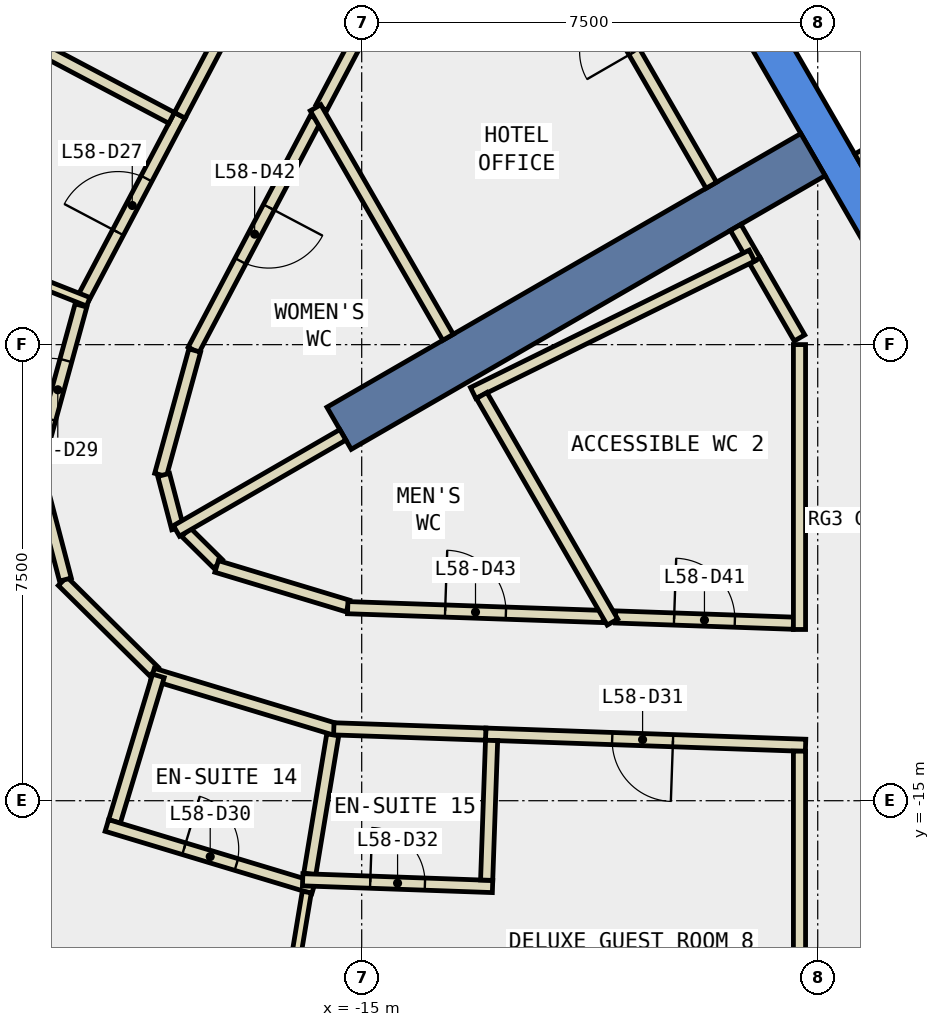
"""IFC4 building model, lengths in metres.
Left out: names, types, materials, properties, quantities, classifications, styles, units other than length and angle.
Written with IfcOpenShell. Run it as: python <this file> out.ifc"""

import sys

from ifc_helpers import new_model, si_unit, direction, frame, frame_2d, origin, place, context, subcontext, project, spatial, polyline, rectangle, outline, extrude, element, fill, save


model = new_model("IFC4")
c1 = context("Model", 3, precision=1e-05, world=origin(), true_north=direction((0.0, 1.0)))
c2 = subcontext(c1, "Body", "Model", "MODEL_VIEW")
j1 = project(units=[si_unit("LENGTHUNIT", "METRE"), si_unit("PLANEANGLEUNIT", "RADIAN")], contexts=[c1])
p1 = place(None, origin())
s1 = spatial("IfcSite", under=j1, at=p1, CompositionType="ELEMENT")
p2 = place(p1, origin())
s2 = spatial("IfcBuilding", under=s1, at=p2, CompositionType="ELEMENT")
p3 = place(p2, frame((0.0, 0.0, 255.8)))
s3 = spatial("IfcBuildingStorey", under=s2, at=p3, CompositionType="ELEMENT", Elevation=255.8)
p4 = place(p3, frame((0.0, 0.0, -0.34)))
e1 = element("IfcWall", 1, at=p4, inside=s3, PredefinedType="SHEAR", context=c2, shape_type="SweptSolid", body=[
    extrude(outline(polyline([(-11.547, 2.5), (-5.774, -7.5), (-5.427, -6.9), (-10.854, 2.5), (-11.547, 2.5)])), origin(), (0.0, 0.0, 1.0), 3.6),
])
p5 = place(p3, frame((-7.578, -4.375, -0.34), z_axis=(0.0, 0.0, 1.0), x_axis=(-0.866024315419, -0.5000018851, 0.0)))
e2 = element("IfcWall", 2, at=p5, inside=s3, PredefinedType="SHEAR", context=c2, shape_type="SweptSolid", body=[
    extrude(rectangle(XDim=9.0, YDim=0.8, at=frame_2d((4.5, 0.0))), origin(), (0.0, 0.0, 1.0), 3.6),
])
p6 = place(p3, frame((-8.532, -6.123, 0.0), z_axis=(0.0, 0.0, 1.0), x_axis=(-0.499977104415, 0.866038622153, 0.0)))
e3 = element("IfcWall", 3, at=p6, inside=s3, PredefinedType="PARTITIONING", context=c2, shape_type="SweptSolid", body=[
    extrude(rectangle(XDim=0.636, YDim=0.2, at=frame_2d((0.318, 0.0))), origin(), (0.0, 0.0, 1.0), 3.26),
])
p7 = place(p3, frame((-15.064, -2.468, 0.0), z_axis=(0.0, 0.0, 1.0), x_axis=(-0.467126648849, -0.884190417238, 0.0)))
e4 = element("IfcWall", 4, at=p7, inside=s3, PredefinedType="PARTITIONING", context=c2, shape_type="SweptSolid", body=[
    extrude(rectangle(XDim=1.282, YDim=0.2, at=frame_2d((0.641, 0.0))), origin(), (0.0, 0.0, 1.0), 3.26),
])
p8 = place(p3, frame((-7.8, -7.39, 0.0), z_axis=(0.0, 0.0, 1.0), x_axis=(-0.500266477503, 0.865871498253, 0.0)))
e5 = element("IfcWall", 5, at=p8, inside=s3, PredefinedType="PARTITIONING", context=c2, shape_type="SweptSolid", body=[
    extrude(rectangle(XDim=1.463, YDim=0.2, at=frame_2d((0.731, 0.0))), origin(), (0.0, 0.0, 1.0), 3.26),
])
p9 = place(p3, frame((-10.826, -11.978, 0.0), z_axis=(0.0, 0.0, 1.0), x_axis=(0.999380679818, -0.035188873332, 0.0)))
e6 = element("IfcWall", 6, at=p9, inside=s3, PredefinedType="PARTITIONING", context=c2, shape_type="SweptSolid", body=[
    extrude(rectangle(XDim=2.928, YDim=0.2, at=frame_2d((1.464, 0.0))), origin(), (0.0, 0.0, 1.0), 3.26),
])
p10 = place(p9, frame((0.964, 0.0, 0.0)))
e7 = element("IfcOpeningElement", 7, at=p10, cuts=e6, PredefinedType="OPENING", context=c2, shape_type="SweptSolid", body=[
    extrude(rectangle(XDim=1.0, YDim=2.1, at=frame_2d((0.5, 1.05))), frame((0.0, 0.11, 0.0), z_axis=(0.0, -1.0, 0.0), x_axis=(1.0, 0.0, 0.0)), (0.0, 0.0, 1.0), 0.22),
])
p11 = place(p3, frame((-15.756, -3.779, 0.0), z_axis=(0.0, 0.0, 1.0), x_axis=(-0.46672043873, -0.884404902786, 0.0)))
e8 = element("IfcWall", 8, at=p11, inside=s3, PredefinedType="PARTITIONING", context=c2, shape_type="SweptSolid", body=[
    extrude(rectangle(XDim=4.307, YDim=0.2, at=frame_2d((2.153, 0.0))), origin(), (0.0, 0.0, 1.0), 3.26),
])
p12 = place(p11, frame((1.653, 0.0, 0.0)))
e9 = element("IfcOpeningElement", 9, at=p12, cuts=e8, PredefinedType="OPENING", context=c2, shape_type="SweptSolid", body=[
    extrude(rectangle(XDim=1.0, YDim=2.1, at=frame_2d((0.5, 1.05))), frame((0.0, 0.11, 0.0), z_axis=(0.0, -1.0, 0.0), x_axis=(1.0, 0.0, 0.0)), (0.0, 0.0, 1.0), 0.22),
])
p13 = place(p3, frame((-17.746, -7.596, 0.0), z_axis=(0.0, 0.0, 1.0), x_axis=(-0.264859637197, -0.96428697626, 0.0)))
e10 = element("IfcWall", 10, at=p13, inside=s3, PredefinedType="PARTITIONING", context=c2, shape_type="SweptSolid", body=[
    extrude(rectangle(XDim=2.122, YDim=0.2, at=frame_2d((1.061, 0.0))), origin(), (0.0, 0.0, 1.0), 3.26),
])
p14 = place(p3, frame((-18.257, -9.642, 0.0), z_axis=(0.0, 0.0, 1.0), x_axis=(0.253407342366, -0.967359663639, 0.0)))
e11 = element("IfcWall", 11, at=p14, inside=s3, PredefinedType="PARTITIONING", context=c2, shape_type="SweptSolid", body=[
    extrude(rectangle(XDim=0.907, YDim=0.2, at=frame_2d((0.454, 0.0))), origin(), (0.0, 0.0, 1.0), 3.26),
])
p15 = place(p3, frame((-17.89, -10.584, 0.0), z_axis=(0.0, 0.0, 1.0), x_axis=(0.711042348586, -0.70314918653, 0.0)))
e12 = element("IfcWall", 12, at=p15, inside=s3, PredefinedType="PARTITIONING", context=c2, shape_type="SweptSolid", body=[
    extrude(rectangle(XDim=0.742, YDim=0.2, at=frame_2d((0.371, 0.0))), origin(), (0.0, 0.0, 1.0), 3.26),
])
p16 = place(p3, frame((-17.386, -11.147, 0.0), z_axis=(0.0, 0.0, 1.0), x_axis=(0.957321496956, -0.289025174451, 0.0)))
e13 = element("IfcWall", 13, at=p16, inside=s3, PredefinedType="PARTITIONING", context=c2, shape_type="SweptSolid", body=[
    extrude(rectangle(XDim=2.256, YDim=0.2, at=frame_2d((1.128, 0.0))), origin(), (0.0, 0.0, 1.0), 3.26),
])
p17 = place(p3, frame((-15.23, -11.825, 0.0), z_axis=(0.0, 0.0, 1.0), x_axis=(0.999397560436, -0.0347061406, 0.0)))
e14 = element("IfcWall", 14, at=p17, inside=s3, PredefinedType="PARTITIONING", context=c2, shape_type="SweptSolid", body=[
    extrude(rectangle(XDim=4.207, YDim=0.2, at=frame_2d((2.103, 0.0))), origin(), (0.0, 0.0, 1.0), 3.26),
])
p18 = place(p17, frame((1.603, 0.0, 0.0)))
e15 = element("IfcOpeningElement", 15, at=p18, cuts=e14, PredefinedType="OPENING", context=c2, shape_type="SweptSolid", body=[
    extrude(rectangle(XDim=1.0, YDim=2.1, at=frame_2d((0.5, 1.05))), frame((0.0, 0.11, 0.0), z_axis=(0.0, -1.0, 0.0), x_axis=(1.0, 0.0, 0.0)), (0.0, 0.0, 1.0), 0.22),
])
p19 = place(p3, frame((-19.602, -6.781, 0.0), z_axis=(0.0, 0.0, 1.0), x_axis=(0.466827780692, 0.884348247679, 0.0)))
e16 = element("IfcWall", 16, at=p19, inside=s3, PredefinedType="PARTITIONING", context=c2, shape_type="SweptSolid", body=[
    extrude(rectangle(XDim=3.451, YDim=0.2, at=frame_2d((1.726, 0.0))), origin(), (0.0, 0.0, 1.0), 3.26),
])
p20 = place(p19, frame((1.275, 0.0, 0.0)))
e17 = element("IfcOpeningElement", 17, at=p20, cuts=e16, PredefinedType="OPENING", context=c2, shape_type="SweptSolid", body=[
    extrude(rectangle(XDim=1.0, YDim=2.1, at=frame_2d((0.5, 1.05))), frame((0.0, 0.11, 0.0), z_axis=(0.0, -1.0, 0.0), x_axis=(1.0, 0.0, 0.0)), (0.0, 0.0, 1.0), 0.22),
])
p21 = place(p3, frame((-17.991, -3.729, 0.0), z_axis=(0.0, 0.0, 1.0), x_axis=(0.466450569784, 0.88454726609, 0.0)))
e18 = element("IfcWall", 18, at=p21, inside=s3, PredefinedType="PARTITIONING", context=c2, shape_type="SweptSolid", body=[
    extrude(rectangle(XDim=2.6, YDim=0.2, at=frame_2d((1.3, 0.0))), origin(), (0.0, 0.0, 1.0), 3.26),
])
p22 = place(p3, frame((-18.415, -12.877, 0.0), z_axis=(0.0, 0.0, 1.0), x_axis=(-0.711078065077, 0.70311306727, 0.0)))
e19 = element("IfcWall", 19, at=p22, inside=s3, PredefinedType="PARTITIONING", context=c2, shape_type="SweptSolid", body=[
    extrude(rectangle(XDim=2.115, YDim=0.2, at=frame_2d((1.058, 0.0))), origin(), (0.0, 0.0, 1.0), 3.26),
])
p23 = place(p3, frame((-19.873, -11.363, 0.0), z_axis=(0.0, 0.0, 1.0), x_axis=(-0.253192482031, 0.967415922467, 0.0)))
e20 = element("IfcWall", 20, at=p23, inside=s3, PredefinedType="PARTITIONING", context=c2, shape_type="SweptSolid", body=[
    extrude(rectangle(XDim=1.792, YDim=0.2, at=frame_2d((0.896, 0.0))), origin(), (0.0, 0.0, 1.0), 3.26),
])
p24 = place(p3, frame((-20.379, -9.629, 0.0), z_axis=(0.0, 0.0, 1.0), x_axis=(0.26487636938, 0.964282380293, 0.0)))
e21 = element("IfcWall", 21, at=p24, inside=s3, PredefinedType="PARTITIONING", context=c2, shape_type="SweptSolid", body=[
    extrude(rectangle(XDim=2.877, YDim=0.2, at=frame_2d((1.438, 0.0))), origin(), (0.0, 0.0, 1.0), 3.26),
])
p25 = place(p24, frame((0.938, 0.0, 0.0)))
e22 = element("IfcOpeningElement", 22, at=p25, cuts=e21, PredefinedType="OPENING", context=c2, shape_type="SweptSolid", body=[
    extrude(rectangle(XDim=1.0, YDim=2.1, at=frame_2d((0.5, 1.05))), frame((0.0, 0.11, 0.0), z_axis=(0.0, -1.0, 0.0), x_axis=(1.0, 0.0, 0.0)), (0.0, 0.0, 1.0), 0.22),
])
p26 = place(p3, frame((-15.363, -13.847, 0.0), z_axis=(0.0, 0.0, 1.0), x_axis=(-0.957320969561, 0.289026921303, 0.0)))
e23 = element("IfcWall", 23, at=p26, inside=s3, PredefinedType="PARTITIONING", context=c2, shape_type="SweptSolid", body=[
    extrude(rectangle(XDim=3.214, YDim=0.2, at=frame_2d((1.607, 0.0))), origin(), (0.0, 0.0, 1.0), 3.26),
])
p27 = place(p3, frame((-7.7, -14.089, 0.0), z_axis=(0.0, 0.0, 1.0), x_axis=(-0.999388410674, 0.034968623214, 0.0)))
e24 = element("IfcWall", 24, at=p27, inside=s3, PredefinedType="PARTITIONING", context=c2, shape_type="SweptSolid", body=[
    extrude(rectangle(XDim=5.264, YDim=0.2, at=frame_2d((2.632, 0.0))), origin(), (0.0, 0.0, 1.0), 3.26),
])
p28 = place(p27, frame((2.182, 0.0, 0.0)))
e25 = element("IfcOpeningElement", 25, at=p28, cuts=e24, PredefinedType="OPENING", context=c2, shape_type="SweptSolid", body=[
    extrude(rectangle(XDim=1.0, YDim=2.1, at=frame_2d((0.5, 1.05))), frame((0.0, 0.11, 0.0), z_axis=(0.0, -1.0, 0.0), x_axis=(1.0, 0.0, 0.0)), (0.0, 0.0, 1.0), 0.22),
])
p29 = place(p3, frame((-12.961, -13.905, 0.0), z_axis=(0.0, 0.0, 1.0), x_axis=(-0.999395279268, 0.034771766949, 0.0)))
e26 = element("IfcWall", 26, at=p29, inside=s3, PredefinedType="PARTITIONING", context=c2, shape_type="SweptSolid", body=[
    extrude(rectangle(XDim=2.5, YDim=0.2, at=frame_2d((1.25, 0.0))), origin(), (0.0, 0.0, 1.0), 3.26),
])
p30 = place(p3, frame((-6.841, -4.452, 0.0), z_axis=(0.0, 0.0, 1.0), x_axis=(0.86621513555, 0.499671230855, 0.0)))
e27 = element("IfcWall", 27, at=p30, inside=s3, PredefinedType="PARTITIONING", context=c2, shape_type="SweptSolid", body=[
    extrude(rectangle(XDim=1.1, YDim=0.2, at=frame_2d((0.55, 0.0))), origin(), (0.0, 0.0, 1.0), 3.26),
])
p31 = place(p3, frame((-7.8, -12.184, 0.0), z_axis=(0.0, 0.0, 1.0), x_axis=(0.0, 1.0, 0.0)))
e28 = element("IfcWall", 28, at=p31, inside=s3, PredefinedType="PARTITIONING", context=c2, shape_type="SweptSolid", body=[
    extrude(rectangle(XDim=4.685, YDim=0.2, at=frame_2d((2.343, 0.0))), origin(), (0.0, 0.0, 1.0), 3.26),
])
p32 = place(p3, frame((-7.8, -18.669, 0.0), z_axis=(0.0, 0.0, 1.0), x_axis=(0.0, 1.0, 0.0)))
e29 = element("IfcWall", 29, at=p32, inside=s3, PredefinedType="PARTITIONING", context=c2, shape_type="SweptSolid", body=[
    extrude(rectangle(XDim=4.484, YDim=0.2, at=frame_2d((2.242, 0.0))), origin(), (0.0, 0.0, 1.0), 3.26),
])
p33 = place(p3, frame((-8.582, -6.036, 0.0), z_axis=(0.0, 0.0, 1.0), x_axis=(-0.897105141673, -0.441817116897, 0.0)))
e30 = element("IfcWall", 30, at=p33, inside=s3, PredefinedType="PARTITIONING", context=c2, shape_type="SweptSolid", body=[
    extrude(rectangle(XDim=5.111, YDim=0.2, at=frame_2d((2.555, 0.0))), origin(), (0.0, 0.0, 1.0), 3.26),
])
p34 = place(p3, frame((-13.58, -7.379, 0.0), z_axis=(0.0, 0.0, 1.0), x_axis=(-0.499916403993, 0.866073662582, 0.0)))
e31 = element("IfcWall", 31, at=p34, inside=s3, PredefinedType="PARTITIONING", context=c2, shape_type="SweptSolid", body=[
    extrude(rectangle(XDim=4.359, YDim=0.2, at=frame_2d((2.179, 0.0))), origin(), (0.0, 0.0, 1.0), 3.26),
])
p35 = place(p3, frame((-10.876, -12.062, 0.0), z_axis=(0.0, 0.0, 1.0), x_axis=(-0.499977877545, 0.866038175813, 0.0)))
e32 = element("IfcWall", 32, at=p35, inside=s3, PredefinedType="PARTITIONING", context=c2, shape_type="SweptSolid", body=[
    extrude(rectangle(XDim=4.302, YDim=0.2, at=frame_2d((2.151, 0.0))), origin(), (0.0, 0.0, 1.0), 3.26),
])
p36 = place(p3, frame((-15.31, -8.983, 0.0), z_axis=(0.0, 0.0, 1.0), x_axis=(-0.866047943894, -0.499960957353, 0.0)))
e33 = element("IfcWall", 33, at=p36, inside=s3, PredefinedType="PARTITIONING", context=c2, shape_type="SweptSolid", body=[
    extrude(rectangle(XDim=3.16, YDim=0.2, at=frame_2d((1.58, 0.0))), origin(), (0.0, 0.0, 1.0), 3.26),
])
p37 = place(p3, frame((-19.069, -0.418, 0.0), z_axis=(0.0, 0.0, 1.0), x_axis=(-0.467007153784, -0.884253537349, 0.0)))
e34 = element("IfcWall", 34, at=p37, inside=s3, PredefinedType="PARTITIONING", context=c2, shape_type="SweptSolid", body=[
    extrude(rectangle(XDim=2.625, YDim=0.2, at=frame_2d((1.312, 0.0))), origin(), (0.0, 0.0, 1.0), 3.26),
])
p38 = place(p37, frame((0.763, 0.0, 0.0)))
e35 = element("IfcOpeningElement", 35, at=p38, cuts=e34, PredefinedType="OPENING", context=c2, shape_type="SweptSolid", body=[
    extrude(rectangle(XDim=0.9, YDim=2.1, at=frame_2d((0.45, 1.05))), frame((0.0, 0.11, 0.0), z_axis=(0.0, -1.0, 0.0), x_axis=(1.0, 0.0, 0.0)), (0.0, 0.0, 1.0), 0.22),
])
p39 = place(p3, frame((-20.16, -2.697, 0.0), z_axis=(0.0, 0.0, 1.0), x_axis=(0.884293452572, -0.466931568583, 0.0)))
e36 = element("IfcWall", 36, at=p39, inside=s3, PredefinedType="PARTITIONING", context=c2, shape_type="SweptSolid", body=[
    extrude(rectangle(XDim=2.3, YDim=0.2, at=frame_2d((1.15, 0.0))), origin(), (0.0, 0.0, 1.0), 3.26),
])
p40 = place(p3, frame((-19.497, -6.795, 0.0), z_axis=(0.0, 0.0, 1.0), x_axis=(-0.929826906887, 0.367997178289, 0.0)))
e37 = element("IfcWall", 37, at=p40, inside=s3, PredefinedType="PARTITIONING", context=c2, shape_type="SweptSolid", body=[
    extrude(rectangle(XDim=4.717, YDim=0.15, at=frame_2d((2.358, 0.0))), origin(), (0.0, 0.0, 1.0), 3.26),
])
p41 = place(p3, frame((-18.344, -12.947, 0.0), z_axis=(0.0, 0.0, 1.0), x_axis=(-0.288709122303, -0.957416859419, 0.0)))
e38 = element("IfcWall", 38, at=p41, inside=s3, PredefinedType="PARTITIONING", context=c2, shape_type="SweptSolid", body=[
    extrude(rectangle(XDim=2.5, YDim=0.2, at=frame_2d((1.25, 0.0))), origin(), (0.0, 0.0, 1.0), 3.26),
])
p42 = place(p3, frame((-19.191, -15.407, 0.0), z_axis=(0.0, 0.0, 1.0), x_axis=(0.957443200759, -0.28862175476, 0.0)))
e39 = element("IfcWall", 39, at=p42, inside=s3, PredefinedType="PARTITIONING", context=c2, shape_type="SweptSolid", body=[
    extrude(rectangle(XDim=3.551, YDim=0.2, at=frame_2d((1.775, 0.0))), origin(), (0.0, 0.0, 1.0), 3.26),
])
p43 = place(p42, frame((1.325, 0.0, 0.0)))
e40 = element("IfcOpeningElement", 40, at=p43, cuts=e39, PredefinedType="OPENING", context=c2, shape_type="SweptSolid", body=[
    extrude(rectangle(XDim=0.9, YDim=2.1, at=frame_2d((0.45, 1.05))), frame((0.0, 0.11, 0.0), z_axis=(0.0, -1.0, 0.0), x_axis=(1.0, 0.0, 0.0)), (0.0, 0.0, 1.0), 0.22),
])
p44 = place(p3, frame((-15.903, -16.502, 0.0), z_axis=(0.0, 0.0, 1.0), x_axis=(-0.163715562906, -0.986507584594, 0.0)))
e41 = element("IfcWall", 41, at=p44, inside=s3, PredefinedType="PARTITIONING", context=c2, shape_type="SweptSolid", body=[
    extrude(rectangle(XDim=1.912, YDim=0.15, at=frame_2d((0.956, 0.0))), origin(), (0.0, 0.0, 1.0), 3.26),
])
p45 = place(p3, frame((-15.476, -13.917, 0.0), z_axis=(0.0, 0.0, 1.0), x_axis=(-0.162964805234, -0.986631882849, 0.0)))
e42 = element("IfcWall", 42, at=p45, inside=s3, PredefinedType="PARTITIONING", context=c2, shape_type="SweptSolid", body=[
    extrude(rectangle(XDim=2.319, YDim=0.2, at=frame_2d((1.16, 0.0))), origin(), (0.0, 0.0, 1.0), 3.26),
])
p46 = place(p3, frame((-15.971, -16.3, 0.0), z_axis=(0.0, 0.0, 1.0), x_axis=(0.999370791233, -0.035468600627, 0.0)))
e43 = element("IfcWall", 43, at=p46, inside=s3, PredefinedType="PARTITIONING", context=c2, shape_type="SweptSolid", body=[
    extrude(rectangle(XDim=3.125, YDim=0.2, at=frame_2d((1.562, 0.0))), origin(), (0.0, 0.0, 1.0), 3.26),
])
p47 = place(p46, frame((1.112, 0.0, 0.0)))
e44 = element("IfcOpeningElement", 44, at=p47, cuts=e43, PredefinedType="OPENING", context=c2, shape_type="SweptSolid", body=[
    extrude(rectangle(XDim=0.9, YDim=2.1, at=frame_2d((0.45, 1.05))), frame((0.0, 0.11, 0.0), z_axis=(0.0, -1.0, 0.0), x_axis=(1.0, 0.0, 0.0)), (0.0, 0.0, 1.0), 0.22),
])
p48 = place(p3, frame((-12.945, -16.307, 0.0), z_axis=(0.0, 0.0, 1.0), x_axis=(0.035252193458, 0.999378448265, 0.0)))
e45 = element("IfcWall", 45, at=p48, inside=s3, PredefinedType="PARTITIONING", context=c2, shape_type="SweptSolid", body=[
    extrude(rectangle(XDim=2.299, YDim=0.2, at=frame_2d((1.15, 0.0))), origin(), (0.0, 0.0, 1.0), 3.26),
])
p49 = place(p3, frame((-9.25, -4.879, 0.0), z_axis=(0.0, 0.0, 1.0), x_axis=(-0.499944124422, 0.866057661161, 0.0)))
e46 = element("IfcWall", 46, at=p49, inside=s3, PredefinedType="PARTITIONING", context=c2, shape_type="SweptSolid", body=[
    extrude(rectangle(XDim=7.405, YDim=0.2, at=frame_2d((3.702, 0.0))), origin(), (0.0, 0.0, 1.0), 3.26),
])
p50 = place(p49, frame((2.533, 0.0, 0.0)))
e47 = element("IfcOpeningElement", 47, at=p50, cuts=e46, PredefinedType="OPENING", context=c2, shape_type="SweptSolid", body=[
    extrude(rectangle(XDim=0.9, YDim=2.1, at=frame_2d((0.45, 1.05))), frame((0.0, 0.11, 0.0), z_axis=(0.0, -1.0, 0.0), x_axis=(1.0, 0.0, 0.0)), (0.0, 0.0, 1.0), 0.22),
])
p51 = place(p3, frame((-8.192, 0.888, 0.0), z_axis=(0.0, 0.0, 1.0), x_axis=(0.500034260056, -0.866005622828, 0.0)))
e48 = element("IfcWall", 48, at=p51, inside=s3, PredefinedType="STANDARD", context=c2, shape_type="SweptSolid", body=[
    extrude(rectangle(XDim=5.399, YDim=0.2, at=frame_2d((2.7, 0.0))), origin(), (0.0, 0.0, 1.0), 3.26),
])
p52 = place(p20, origin())
e49 = element("IfcDoor", 49, at=p52, inside=s3, OperationType="SINGLE_SWING_LEFT", PredefinedType="DOOR", context=c2, shape_type="SweptSolid", body=[
    extrude(rectangle(XDim=1.0, YDim=2.1, at=frame_2d((0.5, 1.05))), frame((0.0, 0.025, 0.0), z_axis=(0.0, -1.0, 0.0), x_axis=(1.0, 0.0, 0.0)), (0.0, 0.0, 1.0), 0.05),
])
fill(e17, e49)
p53 = place(p25, origin())
e50 = element("IfcDoor", 50, at=p53, inside=s3, OperationType="SINGLE_SWING_LEFT", PredefinedType="DOOR", context=c2, shape_type="SweptSolid", body=[
    extrude(rectangle(XDim=1.0, YDim=2.1, at=frame_2d((0.5, 1.05))), frame((0.0, 0.025, 0.0), z_axis=(0.0, -1.0, 0.0), x_axis=(1.0, 0.0, 0.0)), (0.0, 0.0, 1.0), 0.05),
])
fill(e22, e50)
p54 = place(p43, origin())
e51 = element("IfcDoor", 51, at=p54, inside=s3, OperationType="SINGLE_SWING_LEFT", PredefinedType="DOOR", context=c2, shape_type="SweptSolid", body=[
    extrude(rectangle(XDim=0.9, YDim=2.1, at=frame_2d((0.45, 1.05))), frame((0.0, 0.025, 0.0), z_axis=(0.0, -1.0, 0.0), x_axis=(1.0, 0.0, 0.0)), (0.0, 0.0, 1.0), 0.05),
])
fill(e40, e51)
p55 = place(p28, origin())
e52 = element("IfcDoor", 52, at=p55, inside=s3, OperationType="SINGLE_SWING_LEFT", PredefinedType="DOOR", context=c2, shape_type="SweptSolid", body=[
    extrude(rectangle(XDim=1.0, YDim=2.1, at=frame_2d((0.5, 1.05))), frame((0.0, 0.025, 0.0), z_axis=(0.0, -1.0, 0.0), x_axis=(1.0, 0.0, 0.0)), (0.0, 0.0, 1.0), 0.05),
])
fill(e25, e52)
p56 = place(p47, origin())
e53 = element("IfcDoor", 53, at=p56, inside=s3, OperationType="SINGLE_SWING_LEFT", PredefinedType="DOOR", context=c2, shape_type="SweptSolid", body=[
    extrude(rectangle(XDim=0.9, YDim=2.1, at=frame_2d((0.45, 1.05))), frame((0.0, 0.025, 0.0), z_axis=(0.0, -1.0, 0.0), x_axis=(1.0, 0.0, 0.0)), (0.0, 0.0, 1.0), 0.05),
])
fill(e44, e53)
p57 = place(p50, origin())
e54 = element("IfcDoor", 54, at=p57, inside=s3, OperationType="SINGLE_SWING_RIGHT", PredefinedType="DOOR", context=c2, shape_type="SweptSolid", body=[
    extrude(rectangle(XDim=0.9, YDim=2.1, at=frame_2d((0.45, 1.05))), frame((0.0, 0.025, 0.0), z_axis=(0.0, -1.0, 0.0), x_axis=(1.0, 0.0, 0.0)), (0.0, 0.0, 1.0), 0.05),
])
fill(e47, e54)
p58 = place(p10, origin())
e55 = element("IfcDoor", 55, at=p58, inside=s3, OperationType="SINGLE_SWING_LEFT", PredefinedType="DOOR", context=c2, shape_type="SweptSolid", body=[
    extrude(rectangle(XDim=1.0, YDim=2.1, at=frame_2d((0.5, 1.05))), frame((0.0, 0.025, 0.0), z_axis=(0.0, -1.0, 0.0), x_axis=(1.0, 0.0, 0.0)), (0.0, 0.0, 1.0), 0.05),
])
fill(e7, e55)
p59 = place(p12, origin())
e56 = element("IfcDoor", 56, at=p59, inside=s3, OperationType="SINGLE_SWING_LEFT", PredefinedType="DOOR", context=c2, shape_type="SweptSolid", body=[
    extrude(rectangle(XDim=1.0, YDim=2.1, at=frame_2d((0.5, 1.05))), frame((0.0, 0.025, 0.0), z_axis=(0.0, -1.0, 0.0), x_axis=(1.0, 0.0, 0.0)), (0.0, 0.0, 1.0), 0.05),
])
fill(e9, e56)
p60 = place(p18, origin())
e57 = element("IfcDoor", 57, at=p60, inside=s3, OperationType="SINGLE_SWING_LEFT", PredefinedType="DOOR", context=c2, shape_type="SweptSolid", body=[
    extrude(rectangle(XDim=1.0, YDim=2.1, at=frame_2d((0.5, 1.05))), frame((0.0, 0.025, 0.0), z_axis=(0.0, -1.0, 0.0), x_axis=(1.0, 0.0, 0.0)), (0.0, 0.0, 1.0), 0.05),
])
fill(e15, e57)
save(model, sys.argv[1])
